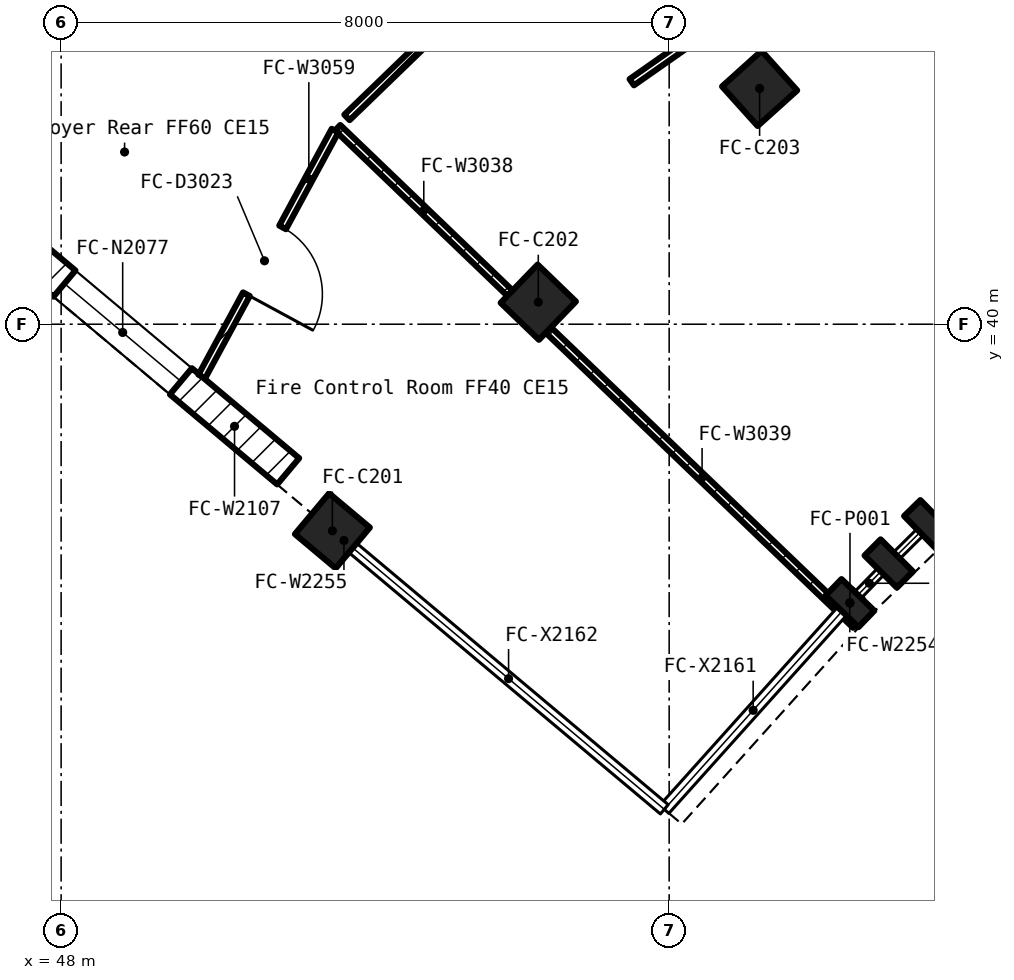
"""IFC4 building model, lengths in metres.
Left out: names, types, materials, properties, quantities, classifications, styles, units other than length and angle.
Written with IfcOpenShell. Run it as: python <this file> out.ifc"""

import sys

from ifc_helpers import new_model, si_unit, direction, frame, frame_2d, origin, origin_2d, place, context, subcontext, project, spatial, rectangle, extrude, element, fill, save


model = new_model("IFC4")
c1 = context("Model", 3, precision=1e-05, world=origin(), true_north=direction((0.0, 1.0)))
c2 = subcontext(c1, "Body", "Model", "MODEL_VIEW")
j1 = project(units=[si_unit("LENGTHUNIT", "METRE"), si_unit("PLANEANGLEUNIT", "RADIAN")], contexts=[c1])
p1 = place(None, origin())
s1 = spatial("IfcSite", under=j1, at=p1, CompositionType="ELEMENT")
p2 = place(p1, origin())
s2 = spatial("IfcBuilding", under=s1, at=p2, CompositionType="ELEMENT")
p3 = place(p2, origin())
s3 = spatial("IfcBuildingStorey", under=s2, at=p3, CompositionType="ELEMENT", Elevation=0.0)
for number, where, z_axis, x_axis in (
    (1, (58.379, 36.331, 0.0), (0.0, 0.0, 1.0), (0.695, 0.719, 0.0)),
    (2, (58.889, 36.852, 0.0), (0.0, 0.0, 1.0), (0.705, 0.71, 0.0)),
    (3, (59.408, 37.367, 0.0), (0.0, 0.0, 1.0), (0.714, 0.7, 0.0)),
):
    element("IfcColumn", number, at=place(p3, frame(where, z_axis=z_axis, x_axis=x_axis)), inside=s3, PredefinedType="COLUMN", context=c2, shape_type="SweptSolid", body=[
        extrude(rectangle(XDim=0.3, YDim=0.6, at=origin_2d()), origin(), (0.0, 0.0, 1.0), 6.0),
    ])
for number, where, z_axis, x_axis in (
    (4, (51.569, 37.282, 0.0), (0.0, 0.0, 1.0), (0.643, 0.766, 0.0)),
    (5, (54.278, 40.29, 0.0), (0.0, 0.0, 1.0), (0.695, 0.719, 0.0)),
    (6, (57.19, 43.102, 0.0), (0.0, 0.0, 1.0), (0.743, 0.669, 0.0)),
):
    element("IfcColumn", number, at=place(p3, frame(where, z_axis=z_axis, x_axis=x_axis)), inside=s3, PredefinedType="COLUMN", context=c2, shape_type="SweptSolid", body=[
        extrude(rectangle(XDim=0.7, YDim=0.7, at=origin_2d()), origin(), (0.0, 0.0, 1.0), 6.0),
    ])
p4 = place(p3, frame((50.987, 38.065, 0.0), z_axis=(0.0, 0.0, 1.0), x_axis=(-0.766076229388, 0.642749726384, 0.0)))
e7 = element("IfcWall", 7, at=p4, inside=s3, PredefinedType="SOLIDWALL", context=c2, shape_type="SweptSolid", body=[
    extrude(rectangle(XDim=5.684, YDim=0.45, at=frame_2d((2.842, 0.0))), origin(), (0.0, 0.0, 1.0), 4.98),
])
p5 = place(p4, frame((1.842, 0.0, 1.0)))
e8 = element("IfcOpeningElement", 8, at=p5, cuts=e7, PredefinedType="OPENING", context=c2, shape_type="SweptSolid", body=[
    extrude(rectangle(XDim=2.0, YDim=2.8, at=frame_2d((1.0, 1.4))), frame((0.0, 0.237, 0.0), z_axis=(0.0, -1.0, 0.0), x_axis=(1.0, 0.0, 0.0)), (0.0, 0.0, 1.0), 0.474),
])
p6 = place(p3, frame((53.905, 40.409, 0.0), z_axis=(0.0, 0.0, 1.0), x_axis=(-0.721447867572, 0.692468753357, 0.0)))
e9 = element("IfcWall", 9, at=p6, inside=s3, PredefinedType="PARTITIONING", context=c2, shape_type="SweptSolid", body=[
    extrude(rectangle(XDim=3.142, YDim=0.1, at=frame_2d((1.571, 0.0))), origin(), (0.0, 0.0, 1.0), 4.88),
])
p7 = place(p3, frame((58.455, 36.042, 0.0), z_axis=(0.0, 0.0, 1.0), x_axis=(-0.721504813875, 0.692409419026, 0.0)))
e10 = element("IfcWall", 10, at=p7, inside=s3, PredefinedType="PARTITIONING", context=c2, shape_type="SweptSolid", body=[
    extrude(rectangle(XDim=5.605, YDim=0.1, at=frame_2d((2.803, 0.0))), origin(), (0.0, 0.0, 1.0), 4.88),
])
p8 = place(p3, frame((55.508, 43.184, 0.0), z_axis=(0.0, 0.0, 1.0), x_axis=(0.81912644488, 0.573612994359, 0.0)))
e11 = element("IfcWall", 11, at=p8, inside=s3, PredefinedType="PARTITIONING", context=c2, shape_type="SweptSolid", body=[
    extrude(rectangle(XDim=6.199, YDim=0.1, at=frame_2d((3.1, 0.0))), origin(), (0.0, 0.0, 1.0), 4.88),
])
p9 = place(p8, frame((2.2, 0.0, 0.0)))
e12 = element("IfcOpeningElement", 12, at=p9, cuts=e11, PredefinedType="OPENING", context=c2, shape_type="SweptSolid", body=[
    extrude(rectangle(XDim=1.8, YDim=2.1, at=frame_2d((0.9, 1.05))), frame((0.0, 0.062, 0.0), z_axis=(0.0, -1.0, 0.0), x_axis=(1.0, 0.0, 0.0)), (0.0, 0.0, 1.0), 0.124),
])
p10 = place(p3, frame((51.604, 42.547, 0.0), z_axis=(0.0, 0.0, 1.0), x_axis=(-0.476404981664, -0.879225962677, 0.0)))
e13 = element("IfcWall", 13, at=p10, inside=s3, PredefinedType="PARTITIONING", context=c2, shape_type="SweptSolid", body=[
    extrude(rectangle(XDim=3.679, YDim=0.1, at=frame_2d((1.84, 0.0))), origin(), (0.0, 0.0, 1.0), 4.88),
])
p11 = place(p10, frame((1.448, 0.0, 0.0)))
e14 = element("IfcOpeningElement", 14, at=p11, cuts=e13, PredefinedType="OPENING", context=c2, shape_type="SweptSolid", body=[
    extrude(rectangle(XDim=1.0, YDim=2.1, at=frame_2d((0.5, 1.05))), frame((0.0, 0.062, 0.0), z_axis=(0.0, -1.0, 0.0), x_axis=(1.0, 0.0, 0.0)), (0.0, 0.0, 1.0), 0.124),
])
p12 = place(p3, frame((51.761, 42.721, 0.0), z_axis=(0.0, 0.0, 1.0), x_axis=(0.719150966755, 0.694853860186, 0.0)))
e15 = element("IfcWall", 15, at=p12, inside=s3, PredefinedType="PARTITIONING", context=c2, shape_type="SweptSolid", body=[
    extrude(rectangle(XDim=3.376, YDim=0.1, at=frame_2d((1.688, 0.0))), origin(), (0.0, 0.0, 1.0), 4.88),
])
p13 = place(p3, frame((58.274, 36.223, 0.0), z_axis=(0.0, 0.0, 1.0), x_axis=(0.668522807688, 0.743691640131, 0.0)))
e16 = element("IfcWall", 16, at=p13, inside=s3, PredefinedType="SOLIDWALL", context=c2, shape_type="SweptSolid", body=[
    extrude(rectangle(XDim=0.305, YDim=0.18, at=frame_2d((0.153, 0.0))), origin(), (0.0, 0.0, 1.0), 5.15),
])
p14 = place(p3, frame((51.838, 37.057, 0.0), z_axis=(0.0, 0.0, 1.0), x_axis=(-0.766382097523, 0.642384994062, 0.0)))
e17 = element("IfcWall", 17, at=p14, inside=s3, PredefinedType="SOLIDWALL", context=c2, shape_type="SweptSolid", body=[
    extrude(rectangle(XDim=0.305, YDim=0.18, at=frame_2d((0.153, 0.0))), origin(), (0.0, 0.0, 1.0), 5.15),
])
p15 = place(p5, origin())
e18 = element("IfcWindow", 18, at=p15, inside=s3, PartitioningType="DOUBLE_PANEL_VERTICAL", PredefinedType="WINDOW", context=c2, shape_type="SweptSolid", body=[
    extrude(rectangle(XDim=2.0, YDim=2.8, at=frame_2d((1.0, 1.4))), frame((0.0, 0.03, 0.0), z_axis=(0.0, -1.0, 0.0), x_axis=(1.0, 0.0, 0.0)), (0.0, 0.0, 1.0), 0.06),
])
fill(e8, e18)
p16 = place(p11, origin())
e19 = element("IfcDoor", 19, at=p16, inside=s3, OperationType="SINGLE_SWING_RIGHT", PredefinedType="DOOR", context=c2, shape_type="SweptSolid", body=[
    extrude(rectangle(XDim=1.0, YDim=2.1, at=frame_2d((0.5, 1.05))), frame((0.0, 0.025, 0.0), z_axis=(0.0, -1.0, 0.0), x_axis=(1.0, 0.0, 0.0)), (0.0, 0.0, 1.0), 0.05),
])
fill(e14, e19)
save(model, sys.argv[1])
